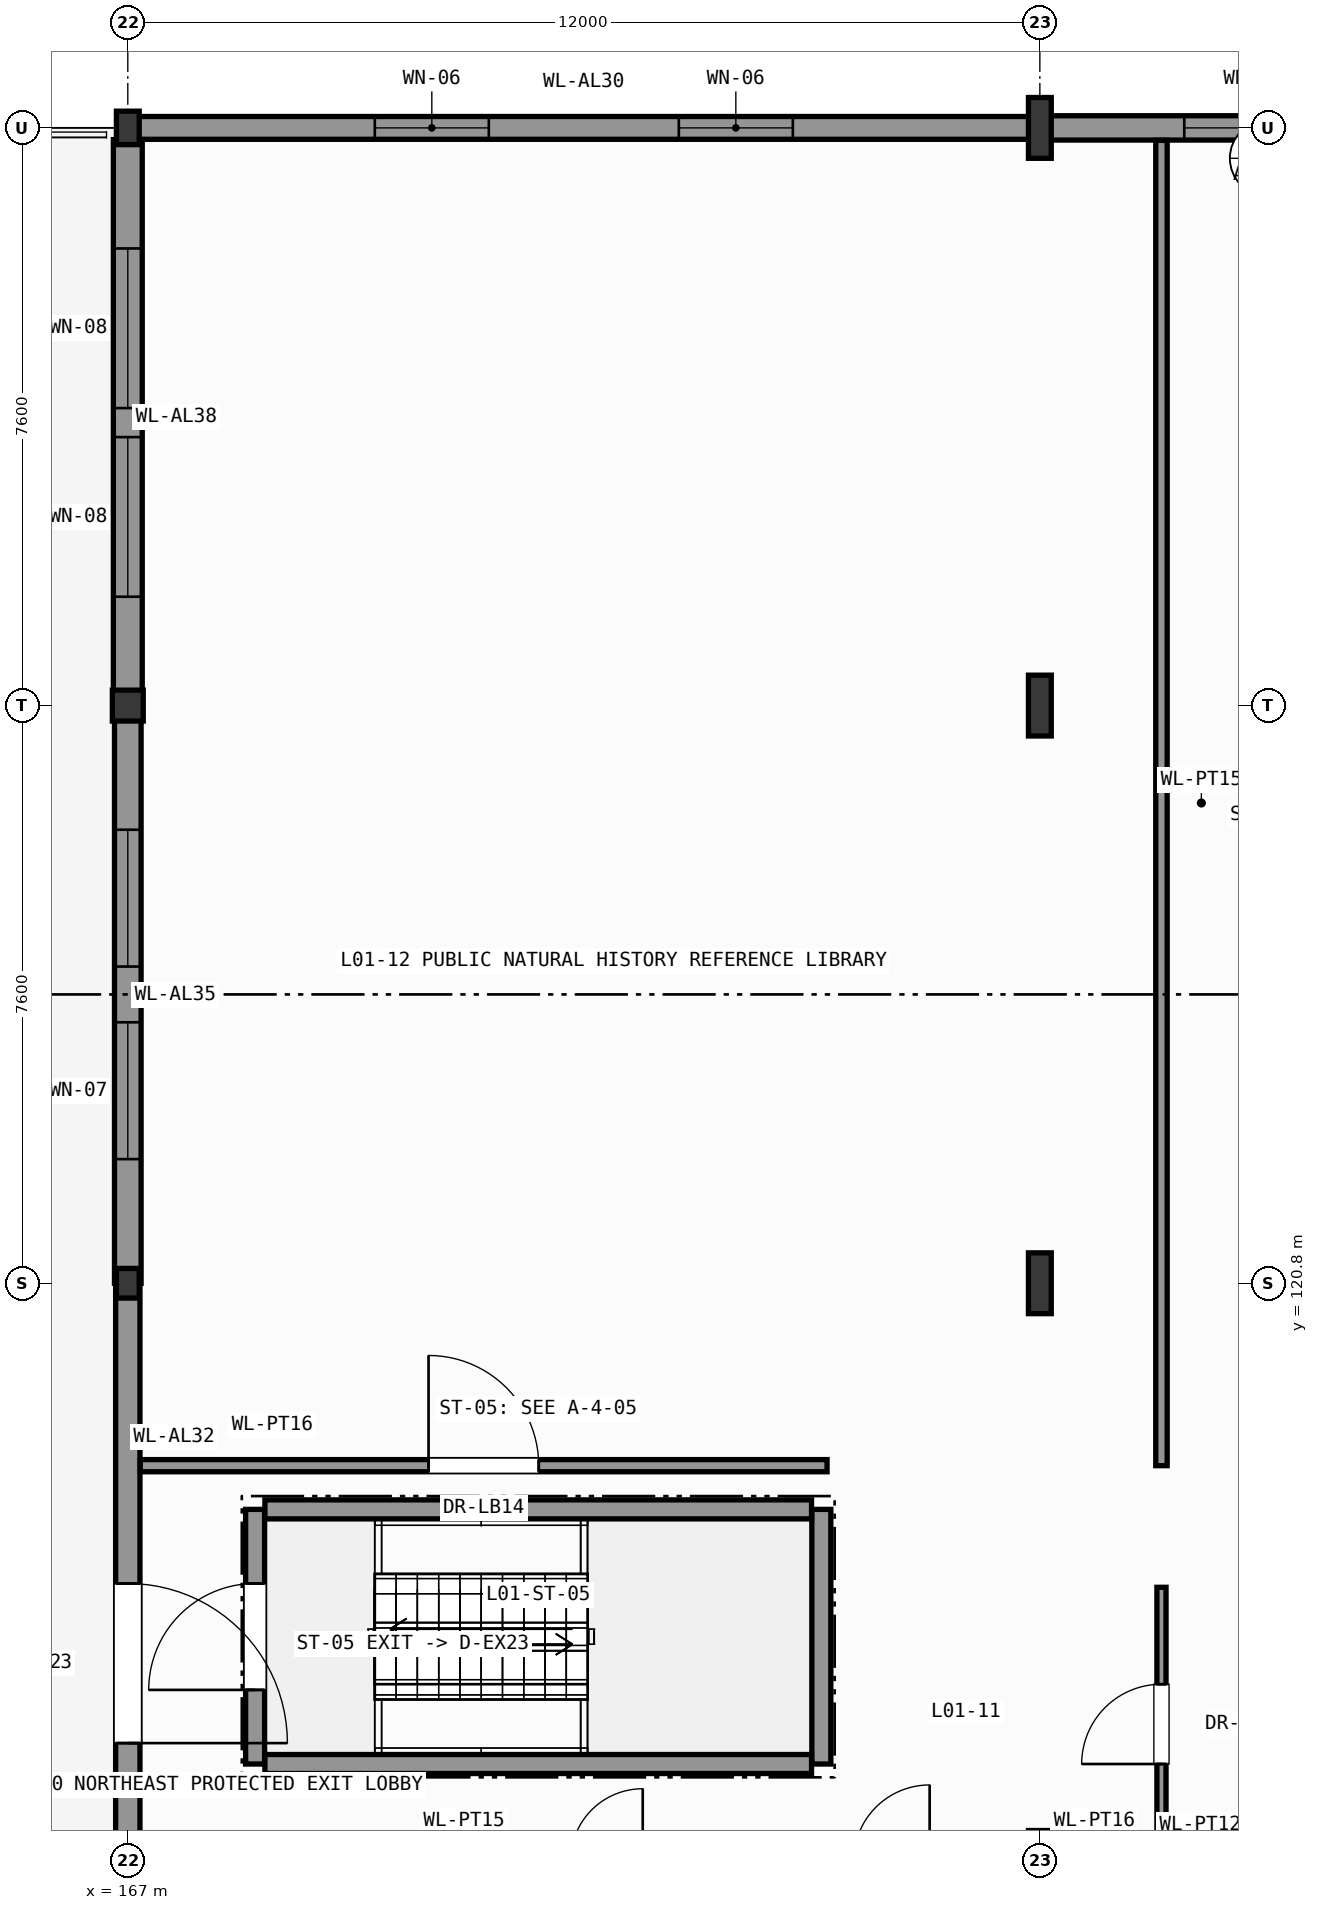
"""IFC4 building model, lengths in metres.
Left out: names, types, materials, properties, quantities, classifications, styles, units other than length and angle.
Written with IfcOpenShell. Run it as: python <this file> out.ifc"""

import sys

from ifc_helpers import new_model, si_unit, direction, frame, frame_2d, origin, origin_2d, place, context, subcontext, project, spatial, rectangle, hollow_circle, i_section, extrude, element, fill, save


model = new_model("IFC4")
c1 = context("Model", 3, precision=1e-05, world=origin(), true_north=direction((0.0, 1.0)))
c2 = subcontext(c1, "Body", "Model", "MODEL_VIEW")
j1 = project(units=[si_unit("LENGTHUNIT", "METRE"), si_unit("PLANEANGLEUNIT", "RADIAN")], contexts=[c1])
p1 = place(None, origin())
s1 = spatial("IfcSite", under=j1, at=p1, CompositionType="ELEMENT")
p2 = place(p1, origin())
s2 = spatial("IfcBuilding", under=s1, at=p2, CompositionType="ELEMENT")
p3 = place(p2, origin())
s3 = spatial("IfcBuildingStorey", under=s2, at=p3, CompositionType="ELEMENT", Elevation=0.0)
p4 = place(p3, frame((167.0, 120.8, 0.0), z_axis=(0.0, 0.0, 1.0), x_axis=(1.0, 0.0, 0.0)))
e1 = element("IfcColumn", 1, at=p4, inside=s3, PredefinedType="COLUMN", context=c2, shape_type="SweptSolid", body=[
    extrude(i_section(OverallWidth=0.3, OverallDepth=0.39, WebThickness=0.011, FlangeThickness=0.019, FilletRadius=0.027, at=origin_2d()), origin(), (0.0, 0.0, 1.0), 7.8),
])
p5 = place(p3, frame((167.0, 128.4, 0.0), z_axis=(0.0, 0.0, 1.0), x_axis=(1.0, 0.0, 0.0)))
e2 = element("IfcColumn", 2, at=p5, inside=s3, PredefinedType="COLUMN", context=c2, shape_type="SweptSolid", body=[
    extrude(hollow_circle(Radius=0.203, WallThickness=0.02, at=origin_2d()), origin(), (0.0, 0.0, 1.0), 7.8),
])
p6 = place(p3, frame((167.0, 136.0, 0.0), z_axis=(0.0, 0.0, 1.0), x_axis=(1.0, 0.0, 0.0)))
e3 = element("IfcColumn", 3, at=p6, inside=s3, PredefinedType="COLUMN", context=c2, shape_type="SweptSolid", body=[
    extrude(i_section(OverallWidth=0.3, OverallDepth=0.44, WebThickness=0.011, FlangeThickness=0.021, FilletRadius=0.027, at=origin_2d()), origin(), (0.0, 0.0, 1.0), 7.8),
])
for number, where, z_axis, x_axis in (
    (4, (179.0, 120.8, 0.0), (0.0, 0.0, 1.0), (1.0, 0.0, 0.0)),
    (5, (179.0, 128.4, 0.0), (0.0, 0.0, 1.0), (1.0, 0.0, 0.0)),
    (6, (179.0, 136.0, 0.0), (0.0, 0.0, 1.0), (1.0, 0.0, 0.0)),
):
    element("IfcColumn", number, at=place(p3, frame(where, z_axis=z_axis, x_axis=x_axis)), inside=s3, PredefinedType="COLUMN", context=c2, shape_type="SweptSolid", body=[
        extrude(i_section(OverallWidth=0.3, OverallDepth=0.8, WebThickness=0.018, FlangeThickness=0.033, FilletRadius=0.03, at=origin_2d()), origin(), (0.0, 0.0, 1.0), 7.8),
    ])
p7 = place(p3, frame((179.0, 136.0, 0.0), z_axis=(0.0, 0.0, 1.0), x_axis=(1.0, 0.0, 0.0)))
e7 = element("IfcWall", 7, at=p7, inside=s3, PredefinedType="SOLIDWALL", context=c2, shape_type="SweptSolid", body=[
    extrude(rectangle(XDim=7.909, YDim=0.32, at=frame_2d((3.955, 0.0))), origin(), (0.0, 0.0, 1.0), 7.54),
])
p8 = place(p7, frame((1.9, 0.0, 0.95)))
e8 = element("IfcOpeningElement", 8, at=p8, cuts=e7, PredefinedType="OPENING", context=c2, shape_type="SweptSolid", body=[
    extrude(rectangle(XDim=1.8, YDim=2.6, at=frame_2d((0.9, 1.3))), frame((0.0, 0.17, 0.0), z_axis=(0.0, -1.0, 0.0), x_axis=(1.0, 0.0, 0.0)), (0.0, 0.0, 1.0), 0.34),
])
p9 = place(p7, frame((4.4, 0.0, 0.95)))
e9 = element("IfcOpeningElement", 9, at=p9, cuts=e7, PredefinedType="OPENING", context=c2, shape_type="SweptSolid", body=[
    extrude(rectangle(XDim=1.8, YDim=2.6, at=frame_2d((0.9, 1.3))), frame((0.0, 0.17, 0.0), z_axis=(0.0, -1.0, 0.0), x_axis=(1.0, 0.0, 0.0)), (0.0, 0.0, 1.0), 0.34),
])
p10 = place(p3, frame((167.0, 136.0, 0.0), z_axis=(0.0, 0.0, 1.0), x_axis=(1.0, 0.0, 0.0)))
e10 = element("IfcWall", 10, at=p10, inside=s3, PredefinedType="SOLIDWALL", context=c2, shape_type="SweptSolid", body=[
    extrude(rectangle(XDim=12.0, YDim=0.3, at=frame_2d((6.0, 0.0))), origin(), (0.0, 0.0, 1.0), 6.925),
])
p11 = place(p10, frame((3.25, 0.0, 0.95)))
e11 = element("IfcOpeningElement", 11, at=p11, cuts=e10, PredefinedType="OPENING", context=c2, shape_type="SweptSolid", body=[
    extrude(rectangle(XDim=1.5, YDim=2.4, at=frame_2d((0.75, 1.2))), frame((0.0, 0.16, 0.0), z_axis=(0.0, -1.0, 0.0), x_axis=(1.0, 0.0, 0.0)), (0.0, 0.0, 1.0), 0.32),
])
p12 = place(p10, frame((7.25, 0.0, 0.95)))
e12 = element("IfcOpeningElement", 12, at=p12, cuts=e10, PredefinedType="OPENING", context=c2, shape_type="SweptSolid", body=[
    extrude(rectangle(XDim=1.5, YDim=2.4, at=frame_2d((0.75, 1.2))), frame((0.0, 0.16, 0.0), z_axis=(0.0, -1.0, 0.0), x_axis=(1.0, 0.0, 0.0)), (0.0, 0.0, 1.0), 0.32),
])
p13 = place(p3, frame((167.0, 128.4, 0.0), z_axis=(0.0, 0.0, 1.0), x_axis=(0.0, 1.0, 0.0)))
e13 = element("IfcWall", 13, at=p13, inside=s3, PredefinedType="SOLIDWALL", context=c2, shape_type="SweptSolid", body=[
    extrude(rectangle(XDim=7.446, YDim=0.38, at=frame_2d((3.723, 0.0))), origin(), (0.0, 0.0, 1.0), 7.235),
])
p14 = place(p13, frame((1.432, 0.0, 0.95)))
e14 = element("IfcOpeningElement", 14, at=p14, cuts=e13, PredefinedType="OPENING", context=c2, shape_type="SweptSolid", body=[
    extrude(rectangle(XDim=2.1, YDim=2.8, at=frame_2d((1.05, 1.4))), frame((0.0, 0.2, 0.0), z_axis=(0.0, -1.0, 0.0), x_axis=(1.0, 0.0, 0.0)), (0.0, 0.0, 1.0), 0.4),
])
p15 = place(p13, frame((3.914, 0.0, 0.95)))
e15 = element("IfcOpeningElement", 15, at=p15, cuts=e13, PredefinedType="OPENING", context=c2, shape_type="SweptSolid", body=[
    extrude(rectangle(XDim=2.1, YDim=2.8, at=frame_2d((1.05, 1.4))), frame((0.0, 0.2, 0.0), z_axis=(0.0, -1.0, 0.0), x_axis=(1.0, 0.0, 0.0)), (0.0, 0.0, 1.0), 0.4),
])
p16 = place(p3, frame((167.0, 120.8, 0.0), z_axis=(0.0, 0.0, 1.0), x_axis=(0.0, 1.0, 0.0)))
e16 = element("IfcWall", 16, at=p16, inside=s3, PredefinedType="SOLIDWALL", context=c2, shape_type="SweptSolid", body=[
    extrude(rectangle(XDim=7.6, YDim=0.35, at=frame_2d((3.8, 0.0))), origin(), (0.0, 0.0, 1.0), 7.235),
])
p17 = place(p16, frame((1.633, 0.0, 0.95)))
e17 = element("IfcOpeningElement", 17, at=p17, cuts=e16, PredefinedType="OPENING", context=c2, shape_type="SweptSolid", body=[
    extrude(rectangle(XDim=1.8, YDim=2.6, at=frame_2d((0.9, 1.3))), frame((0.0, 0.185, 0.0), z_axis=(0.0, -1.0, 0.0), x_axis=(1.0, 0.0, 0.0)), (0.0, 0.0, 1.0), 0.37),
])
p18 = place(p16, frame((4.167, 0.0, 0.95)))
e18 = element("IfcOpeningElement", 18, at=p18, cuts=e16, PredefinedType="OPENING", context=c2, shape_type="SweptSolid", body=[
    extrude(rectangle(XDim=1.8, YDim=2.6, at=frame_2d((0.9, 1.3))), frame((0.0, 0.185, 0.0), z_axis=(0.0, -1.0, 0.0), x_axis=(1.0, 0.0, 0.0)), (0.0, 0.0, 1.0), 0.37),
])
p19 = place(p3, frame((167.0, 113.2, 0.0), z_axis=(0.0, 0.0, 1.0), x_axis=(0.0, 1.0, 0.0)))
e19 = element("IfcWall", 19, at=p19, inside=s3, PredefinedType="SOLIDWALL", context=c2, shape_type="SweptSolid", body=[
    extrude(rectangle(XDim=7.6, YDim=0.32, at=frame_2d((3.8, 0.0))), origin(), (0.0, 0.0, 1.0), 7.235),
])
p20 = place(p19, frame((1.55, 0.0, 0.0)))
e20 = element("IfcOpeningElement", 20, at=p20, cuts=e19, PredefinedType="OPENING", context=c2, shape_type="SweptSolid", body=[
    extrude(rectangle(XDim=2.1, YDim=2.65, at=frame_2d((1.05, 1.325))), frame((0.0, 0.17, 0.0), z_axis=(0.0, -1.0, 0.0), x_axis=(1.0, 0.0, 0.0)), (0.0, 0.0, 1.0), 0.34),
])
p21 = place(p3, frame((168.675, 114.475, 0.0), z_axis=(0.0, 0.0, 1.0), x_axis=(0.0, 1.0, 0.0)))
e21 = element("IfcWall", 21, at=p21, inside=s3, PredefinedType="SHEAR", context=c2, shape_type="SweptSolid", body=[
    extrude(rectangle(XDim=3.35, YDim=0.25, at=frame_2d((1.675, 0.0))), origin(), (0.0, 0.0, 1.0), 7.54),
])
p22 = place(p21, frame((0.975, 0.0, 0.0)))
e22 = element("IfcOpeningElement", 22, at=p22, cuts=e21, PredefinedType="OPENING", context=c2, shape_type="SweptSolid", body=[
    extrude(rectangle(XDim=1.4, YDim=2.2, at=frame_2d((0.7, 1.1))), frame((0.0, 0.135, 0.0), z_axis=(0.0, -1.0, 0.0), x_axis=(1.0, 0.0, 0.0)), (0.0, 0.0, 1.0), 0.27),
])
p23 = place(p3, frame((176.125, 114.475, 0.0), z_axis=(0.0, 0.0, 1.0), x_axis=(0.0, 1.0, 0.0)))
e23 = element("IfcWall", 23, at=p23, inside=s3, PredefinedType="SHEAR", context=c2, shape_type="SweptSolid", body=[
    extrude(rectangle(XDim=3.35, YDim=0.25, at=frame_2d((1.675, 0.0))), origin(), (0.0, 0.0, 1.0), 7.54),
])
for number, where, z_axis, x_axis in (
    (24, (168.804, 114.475, 0.0), (0.0, 0.0, 1.0), (1.0, 0.0, 0.0)),
    (25, (168.804, 117.825, 0.0), (0.0, 0.0, 1.0), (1.0, 0.0, 0.0)),
):
    element("IfcWall", number, at=place(p3, frame(where, z_axis=z_axis, x_axis=x_axis)), inside=s3, PredefinedType="SHEAR", context=c2, shape_type="SweptSolid", body=[
        extrude(rectangle(XDim=7.192, YDim=0.25, at=frame_2d((3.596, 0.0))), origin(), (0.0, 0.0, 1.0), 7.54),
    ])
p24 = place(p3, frame((167.164, 118.4, 0.0), z_axis=(0.0, 0.0, 1.0), x_axis=(1.0, 0.0, 0.0)))
e26 = element("IfcWall", 26, at=p24, inside=s3, PredefinedType="PARTITIONING", context=c2, shape_type="SweptSolid", body=[
    extrude(rectangle(XDim=9.036, YDim=0.16, at=frame_2d((4.518, 0.0))), origin(), (0.0, 0.0, 1.0), 7.54),
])
p25 = place(p24, frame((3.793, 0.0, 0.0)))
e27 = element("IfcOpeningElement", 27, at=p25, cuts=e26, PredefinedType="OPENING", context=c2, shape_type="SweptSolid", body=[
    extrude(rectangle(XDim=1.45, YDim=2.35, at=frame_2d((0.725, 1.175))), frame((0.0, 0.09, 0.0), z_axis=(0.0, -1.0, 0.0), x_axis=(1.0, 0.0, 0.0)), (0.0, 0.0, 1.0), 0.18),
])
p26 = place(p3, frame((180.6, 113.2, 0.0), z_axis=(0.0, 0.0, 1.0), x_axis=(0.0, 1.0, 0.0)))
e28 = element("IfcWall", 28, at=p26, inside=s3, PredefinedType="PARTITIONING", context=c2, shape_type="SweptSolid", body=[
    extrude(rectangle(XDim=3.6, YDim=0.12, at=frame_2d((1.8, 0.0))), origin(), (0.0, 0.0, 1.0), 7.54),
])
p27 = place(p26, frame((1.275, 0.0, 0.0)))
e29 = element("IfcOpeningElement", 29, at=p27, cuts=e28, PredefinedType="OPENING", context=c2, shape_type="SweptSolid", body=[
    extrude(rectangle(XDim=1.05, YDim=2.2, at=frame_2d((0.525, 1.1))), frame((0.0, 0.07, 0.0), z_axis=(0.0, -1.0, 0.0), x_axis=(1.0, 0.0, 0.0)), (0.0, 0.0, 1.0), 0.14),
])
p28 = place(p3, frame((180.6, 118.4, 0.0), z_axis=(0.0, 0.0, 1.0), x_axis=(0.0, 1.0, 0.0)))
e30 = element("IfcWall", 30, at=p28, inside=s3, PredefinedType="PARTITIONING", context=c2, shape_type="SweptSolid", body=[
    extrude(rectangle(XDim=17.436, YDim=0.15, at=frame_2d((8.718, 0.0))), origin(), (0.0, 0.0, 1.0), 7.54),
])
p29 = place(p8, origin())
e31 = element("IfcWindow", 31, at=p29, inside=s3, PartitioningType="SINGLE_PANEL", PredefinedType="WINDOW", context=c2, shape_type="SweptSolid", body=[
    extrude(rectangle(XDim=1.8, YDim=2.6, at=frame_2d((0.9, 1.3))), frame((0.0, 0.03, 0.0), z_axis=(0.0, -1.0, 0.0), x_axis=(1.0, 0.0, 0.0)), (0.0, 0.0, 1.0), 0.06),
])
fill(e8, e31)
p30 = place(p11, origin())
e32 = element("IfcWindow", 32, at=p30, inside=s3, PartitioningType="SINGLE_PANEL", PredefinedType="WINDOW", context=c2, shape_type="SweptSolid", body=[
    extrude(rectangle(XDim=1.5, YDim=2.4, at=frame_2d((0.75, 1.2))), frame((0.0, 0.03, 0.0), z_axis=(0.0, -1.0, 0.0), x_axis=(1.0, 0.0, 0.0)), (0.0, 0.0, 1.0), 0.06),
])
fill(e11, e32)
p31 = place(p12, origin())
e33 = element("IfcWindow", 33, at=p31, inside=s3, PartitioningType="SINGLE_PANEL", PredefinedType="WINDOW", context=c2, shape_type="SweptSolid", body=[
    extrude(rectangle(XDim=1.5, YDim=2.4, at=frame_2d((0.75, 1.2))), frame((0.0, 0.03, 0.0), z_axis=(0.0, -1.0, 0.0), x_axis=(1.0, 0.0, 0.0)), (0.0, 0.0, 1.0), 0.06),
])
fill(e12, e33)
p32 = place(p14, origin())
e34 = element("IfcWindow", 34, at=p32, inside=s3, PartitioningType="SINGLE_PANEL", PredefinedType="WINDOW", context=c2, shape_type="SweptSolid", body=[
    extrude(rectangle(XDim=2.1, YDim=2.8, at=frame_2d((1.05, 1.4))), frame((0.0, 0.03, 0.0), z_axis=(0.0, -1.0, 0.0), x_axis=(1.0, 0.0, 0.0)), (0.0, 0.0, 1.0), 0.06),
])
fill(e14, e34)
p33 = place(p15, origin())
e35 = element("IfcWindow", 35, at=p33, inside=s3, PartitioningType="SINGLE_PANEL", PredefinedType="WINDOW", context=c2, shape_type="SweptSolid", body=[
    extrude(rectangle(XDim=2.1, YDim=2.8, at=frame_2d((1.05, 1.4))), frame((0.0, 0.03, 0.0), z_axis=(0.0, -1.0, 0.0), x_axis=(1.0, 0.0, 0.0)), (0.0, 0.0, 1.0), 0.06),
])
fill(e15, e35)
p34 = place(p17, origin())
e36 = element("IfcWindow", 36, at=p34, inside=s3, PartitioningType="SINGLE_PANEL", PredefinedType="WINDOW", context=c2, shape_type="SweptSolid", body=[
    extrude(rectangle(XDim=1.8, YDim=2.6, at=frame_2d((0.9, 1.3))), frame((0.0, 0.03, 0.0), z_axis=(0.0, -1.0, 0.0), x_axis=(1.0, 0.0, 0.0)), (0.0, 0.0, 1.0), 0.06),
])
fill(e17, e36)
p35 = place(p18, origin())
e37 = element("IfcWindow", 37, at=p35, inside=s3, PartitioningType="SINGLE_PANEL", PredefinedType="WINDOW", context=c2, shape_type="SweptSolid", body=[
    extrude(rectangle(XDim=1.8, YDim=2.6, at=frame_2d((0.9, 1.3))), frame((0.0, 0.03, 0.0), z_axis=(0.0, -1.0, 0.0), x_axis=(1.0, 0.0, 0.0)), (0.0, 0.0, 1.0), 0.06),
])
fill(e18, e37)
p36 = place(p20, origin())
e38 = element("IfcDoor", 38, at=p36, inside=s3, OperationType="SINGLE_SWING_LEFT", PredefinedType="DOOR", context=c2, shape_type="SweptSolid", body=[
    extrude(rectangle(XDim=2.1, YDim=2.65, at=frame_2d((1.05, 1.325))), frame((0.0, 0.025, 0.0), z_axis=(0.0, -1.0, 0.0), x_axis=(1.0, 0.0, 0.0)), (0.0, 0.0, 1.0), 0.05),
])
fill(e20, e38)
p37 = place(p22, origin())
e39 = element("IfcDoor", 39, at=p37, inside=s3, OperationType="SINGLE_SWING_LEFT", PredefinedType="DOOR", context=c2, shape_type="SweptSolid", body=[
    extrude(rectangle(XDim=1.4, YDim=2.2, at=frame_2d((0.7, 1.1))), frame((0.0, 0.025, 0.0), z_axis=(0.0, -1.0, 0.0), x_axis=(1.0, 0.0, 0.0)), (0.0, 0.0, 1.0), 0.05),
])
fill(e22, e39)
p38 = place(p25, origin())
e40 = element("IfcDoor", 40, at=p38, inside=s3, OperationType="SINGLE_SWING_LEFT", PredefinedType="DOOR", context=c2, shape_type="SweptSolid", body=[
    extrude(rectangle(XDim=1.45, YDim=2.35, at=frame_2d((0.725, 1.175))), frame((0.0, 0.025, 0.0), z_axis=(0.0, -1.0, 0.0), x_axis=(1.0, 0.0, 0.0)), (0.0, 0.0, 1.0), 0.05),
])
fill(e27, e40)
p39 = place(p27, origin())
e41 = element("IfcDoor", 41, at=p39, inside=s3, OperationType="SINGLE_SWING_LEFT", PredefinedType="DOOR", context=c2, shape_type="SweptSolid", body=[
    extrude(rectangle(XDim=1.05, YDim=2.2, at=frame_2d((0.525, 1.1))), frame((0.0, 0.025, 0.0), z_axis=(0.0, -1.0, 0.0), x_axis=(1.0, 0.0, 0.0)), (0.0, 0.0, 1.0), 0.05),
])
fill(e29, e41)
save(model, sys.argv[1])
